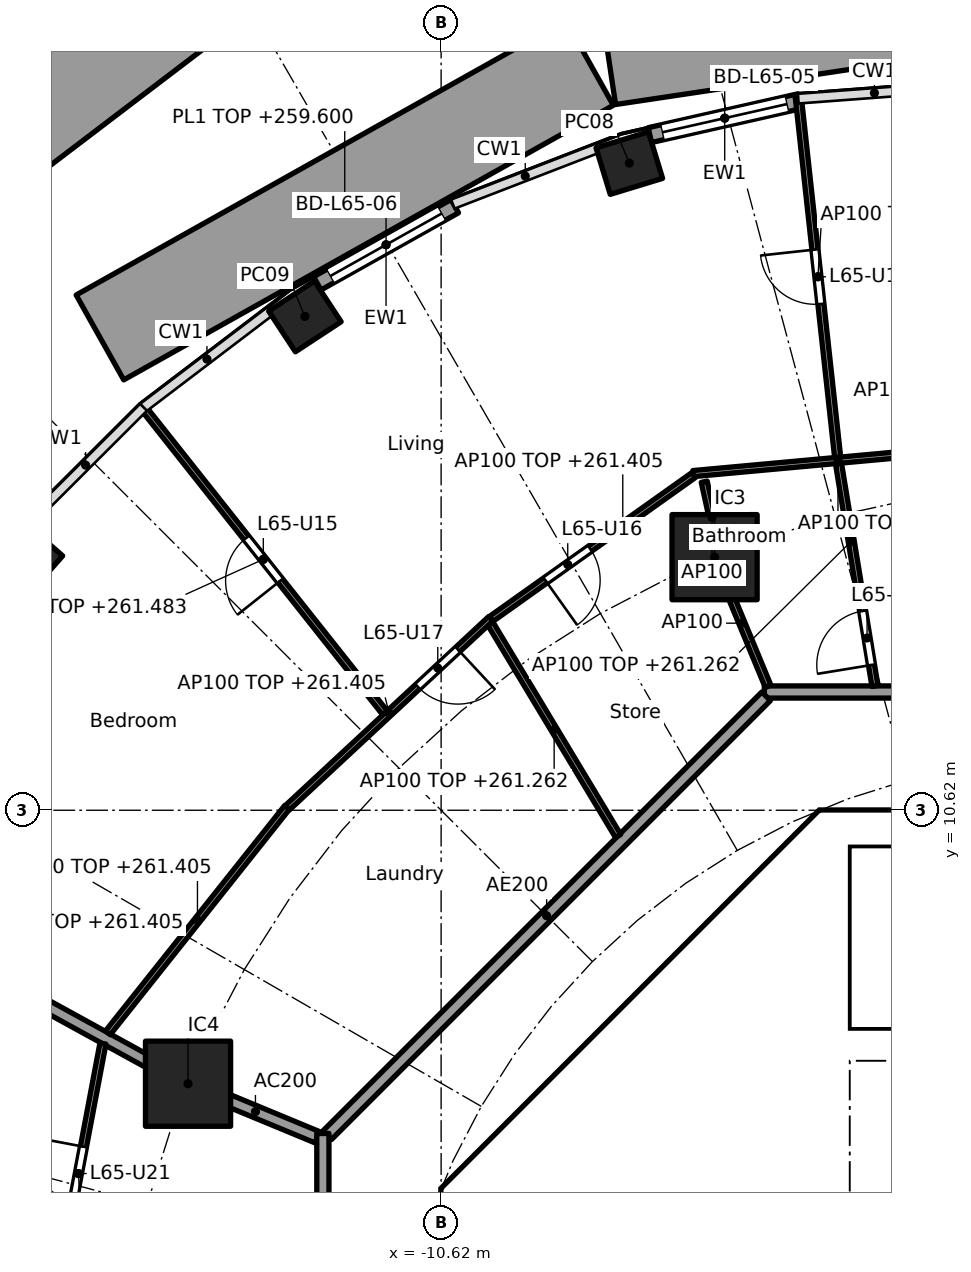
"""IFC4 building model, lengths in metres.
Left out: names, types, materials, properties, quantities, classifications, styles, units other than length and angle.
Written with IfcOpenShell. Run it as: python <this file> out.ifc"""

import sys

from ifc_helpers import new_model, si_unit, direction, frame, frame_2d, origin, origin_2d, place, context, subcontext, project, spatial, polyline, rectangle, hollow_rectangle, outline, extrude, element, fill, save


model = new_model("IFC4")
c1 = context("Model", 3, precision=1e-05, world=origin(), true_north=direction((0.0, 1.0)))
c2 = subcontext(c1, "Body", "Model", "MODEL_VIEW")
j1 = project(units=[si_unit("LENGTHUNIT", "METRE"), si_unit("PLANEANGLEUNIT", "RADIAN")], contexts=[c1])
p1 = place(None, origin())
s1 = spatial("IfcSite", under=j1, at=p1, CompositionType="ELEMENT")
p2 = place(p1, origin())
s2 = spatial("IfcBuilding", under=s1, at=p2, CompositionType="ELEMENT")
p3 = place(p2, frame((0.0, 0.0, 258.5)))
s3 = spatial("IfcBuildingStorey", under=s2, at=p3, CompositionType="ELEMENT", Elevation=258.5)
for number, where, z_axis, x_axis in (
    (1, (-7.525, 21.262, -0.26), (0.0, 0.0, 1.0), (-0.957, -0.292, 0.0)),
    (2, (-12.86, 18.741, -0.26), (0.0, 0.0, 1.0), (-0.836, -0.549, 0.0)),
    (3, (-17.441, 14.73, -0.26), (0.0, 0.0, 1.0), (-0.66, -0.751, 0.0)),
):
    element("IfcColumn", number, at=place(p3, frame(where, z_axis=z_axis, x_axis=x_axis)), inside=s3, PredefinedType="COLUMN", context=c2, shape_type="SweptSolid", body=[
        extrude(hollow_rectangle(XDim=0.9, YDim=0.8, WallThickness=0.028, at=origin_2d()), origin(), (0.0, 0.0, 1.0), 3.96),
    ])
for number, where, z_axis, x_axis in (
    (4, (-6.123, 14.782, 0.0), (0.0, 0.0, 1.0), (1.0, 0.0, 0.0)),
    (5, (-14.782, 6.123, 0.0), (0.0, 0.0, 1.0), (1.0, 0.0, 0.0)),
):
    element("IfcColumn", number, at=place(p3, frame(where, z_axis=z_axis, x_axis=x_axis)), inside=s3, PredefinedType="COLUMN", context=c2, shape_type="SweptSolid", body=[
        extrude(rectangle(XDim=1.4, YDim=1.4, at=origin_2d()), origin(), (0.0, 0.0, 1.0), 3.7),
    ])
p4 = place(p3, frame((-7.188, 21.723, 0.0), z_axis=(0.0, 0.0, 1.0), x_axis=(0.975319584032, 0.220797891756, 0.0)))
e6 = element("IfcWall", 6, at=p4, inside=s3, PredefinedType="SOLIDWALL", context=c2, shape_type="SweptSolid", body=[
    extrude(rectangle(XDim=2.525, YDim=0.25, at=frame_2d((1.263, 0.0))), origin(), (0.0, 0.0, 1.0), 3.44),
])
p5 = place(p4, frame((0.213, 0.0, 0.0)))
e7 = element("IfcOpeningElement", 7, at=p5, cuts=e6, PredefinedType="OPENING", context=c2, shape_type="SweptSolid", body=[
    extrude(rectangle(XDim=2.1, YDim=2.4, at=frame_2d((1.05, 1.2))), frame((0.0, 0.135, 0.0), z_axis=(0.0, -1.0, 0.0), x_axis=(1.0, 0.0, 0.0)), (0.0, 0.0, 1.0), 0.27),
])
p6 = place(p3, frame((-12.656, 19.285, 0.0), z_axis=(0.0, 0.0, 1.0), x_axis=(0.872075426507, 0.489371485154, 0.0)))
e8 = element("IfcWall", 8, at=p6, inside=s3, PredefinedType="SOLIDWALL", context=c2, shape_type="SweptSolid", body=[
    extrude(rectangle(XDim=2.593, YDim=0.25, at=frame_2d((1.297, 0.0))), origin(), (0.0, 0.0, 1.0), 3.44),
])
p7 = place(p6, frame((0.247, 0.0, 0.0)))
e9 = element("IfcOpeningElement", 9, at=p7, cuts=e8, PredefinedType="OPENING", context=c2, shape_type="SweptSolid", body=[
    extrude(rectangle(XDim=2.1, YDim=2.4, at=frame_2d((1.05, 1.2))), frame((0.0, 0.135, 0.0), z_axis=(0.0, -1.0, 0.0), x_axis=(1.0, 0.0, 0.0)), (0.0, 0.0, 1.0), 0.27),
])
p8 = place(p3, frame((-17.7, 21.733, 0.0), z_axis=(0.0, 0.0, 1.0), x_axis=(0.795897017081, 0.605432026078, 0.0)))
e10 = element("IfcWall", 10, at=p8, inside=s3, PredefinedType="SOLIDWALL", context=c2, shape_type="SweptSolid", body=[
    extrude(rectangle(XDim=8.909, YDim=1.6, at=frame_2d((4.454, 0.0))), origin(), (0.0, 0.0, 1.0), 1.1),
])
p9 = place(p3, frame((-8.179, 22.911, 0.0), z_axis=(0.0, 0.0, 1.0), x_axis=(-0.872191481834, -0.489164613413, 0.0)))
e11 = element("IfcWall", 11, at=p9, inside=s3, PredefinedType="SOLIDWALL", context=c2, shape_type="SweptSolid", body=[
    extrude(rectangle(XDim=9.231, YDim=1.6, at=frame_2d((4.615, 0.0))), origin(), (0.0, 0.0, 1.0), 1.1),
])
p10 = place(p3, frame((-1.999, 23.896, 0.0), z_axis=(0.0, 0.0, 1.0), x_axis=(-0.988966799741, -0.148137331587, 0.0)))
e12 = element("IfcWall", 12, at=p10, inside=s3, PredefinedType="SOLIDWALL", context=c2, shape_type="SweptSolid", body=[
    extrude(rectangle(XDim=5.936, YDim=1.6, at=frame_2d((2.968, 0.0))), origin(), (0.0, 0.0, 1.0), 1.1),
])
p11 = place(p3, frame((-4.613, 9.988, 0.0), z_axis=(0.0, 0.0, 1.0), x_axis=(-0.707106781187, -0.707106781187, 0.0)))
e13 = element("IfcWall", 13, at=p11, inside=s3, PredefinedType="SHEAR", context=c2, shape_type="SweptSolid", body=[
    extrude(rectangle(XDim=7.602, YDim=0.6, at=frame_2d((3.801, 0.0))), origin(), (0.0, 0.0, 1.0), 3.44),
])
p12 = place(p11, frame((0.351, 0.0, 0.0)))
e14 = element("IfcOpeningElement", 14, at=p12, cuts=e13, PredefinedType="OPENING", context=c2, shape_type="SweptSolid", body=[
    extrude(rectangle(XDim=1.1, YDim=2.1, at=frame_2d((0.55, 1.05))), frame((0.0, 0.31, 0.0), z_axis=(0.0, -1.0, 0.0), x_axis=(1.0, 0.0, 0.0)), (0.0, 0.0, 1.0), 0.62),
])
p13 = place(p3, frame((-5.8, 4.3, 0.0), z_axis=(0.0, 0.0, 1.0), x_axis=(0.0, 1.0, 0.0)))
e15 = element("IfcWall", 15, at=p13, inside=s3, PredefinedType="PARTITIONING", context=c2, shape_type="SweptSolid", body=[
    extrude(rectangle(XDim=3.927, YDim=0.15, at=frame_2d((1.963, 0.0))), origin(), (0.0, 0.0, 1.0), 3.44),
])
p14 = place(p13, frame((1.551, 0.0, 0.0)))
e16 = element("IfcOpeningElement", 16, at=p14, cuts=e15, PredefinedType="OPENING", context=c2, shape_type="SweptSolid", body=[
    extrude(rectangle(XDim=0.9, YDim=2.1, at=frame_2d((0.45, 1.05))), frame((0.0, 0.085, 0.0), z_axis=(0.0, -1.0, 0.0), x_axis=(1.0, 0.0, 0.0)), (0.0, 0.0, 1.0), 0.17),
])
p15 = place(p3, frame((-4.0, 4.3, 0.0), z_axis=(0.0, 0.0, 1.0), x_axis=(0.0, 1.0, 0.0)))
e17 = element("IfcWall", 17, at=p15, inside=s3, PredefinedType="SOLIDWALL", context=c2, shape_type="SweptSolid", body=[
    extrude(rectangle(XDim=2.2, YDim=0.2, at=frame_2d((1.1, 0.0))), origin(), (0.0, 0.0, 1.0), 3.44),
])
p16 = place(p15, frame((0.55, 0.0, 0.0)))
e18 = element("IfcOpeningElement", 18, at=p16, cuts=e17, PredefinedType="OPENING", context=c2, shape_type="SweptSolid", body=[
    extrude(rectangle(XDim=1.1, YDim=2.1, at=frame_2d((0.55, 1.05))), frame((0.0, 0.11, 0.0), z_axis=(0.0, -1.0, 0.0), x_axis=(1.0, 0.0, 0.0)), (0.0, 0.0, 1.0), 0.22),
])
p17 = place(p3, origin())
e19 = element("IfcWall", 19, at=p17, inside=s3, PredefinedType="SHEAR", context=c2, shape_type="SweptSolid", body=[
    extrude(outline(polyline([(-10.2, 4.825), (-9.776, 4.401), (-10.025, 4.152), (-10.025, 3.801), (-10.625, 3.801), (-10.625, 4.401), (-10.2, 4.825)])), origin(), (0.0, 0.0, 1.0), 3.44),
])
p18 = place(p3, origin())
e20 = element("IfcWall", 20, at=p18, inside=s3, PredefinedType="SHEAR", context=c2, shape_type="SweptSolid", body=[
    extrude(outline(polyline([(-4.152, 10.025), (-4.401, 9.776), (-4.825, 10.2), (-4.401, 10.625), (4.401, 10.625), (4.825, 10.2), (4.401, 9.776), (4.152, 10.025), (-4.152, 10.025)])), origin(), (0.0, 0.0, 1.0), 3.44),
])
p19 = place(p3, origin())
e21 = element("IfcWall", 21, at=p19, inside=s3, PredefinedType="SOLIDWALL", context=c2, shape_type="SweptSolid", body=[
    extrude(outline(polyline([(-3.9, 7.025), (-4.1, 7.025), (-4.1, 10.025), (-3.9, 10.025), (-3.9, 7.025)])), origin(), (0.0, 0.0, 1.0), 3.44),
])
p20 = place(p3, origin())
e22 = element("IfcWall", 22, at=p20, inside=s3, PredefinedType="SOLIDWALL", context=c2, shape_type="SweptSolid", body=[
    extrude(outline(polyline([(4.1, 6.5), (-4.1, 6.5), (-4.1, 7.025), (4.1, 7.025), (4.1, 6.5)])), origin(), (0.0, 0.0, 1.0), 3.44),
])
p21 = place(p3, frame((-12.657, 5.243, 0.0), z_axis=(0.0, 0.0, 1.0), x_axis=(-0.923869415315, 0.382707856524, 0.0)))
e23 = element("IfcWall", 23, at=p21, inside=s3, PredefinedType="PARTITIONING", context=c2, shape_type="SweptSolid", body=[
    extrude(rectangle(XDim=2.2, YDim=0.2, at=frame_2d((1.1, 0.0))), origin(), (0.0, 0.0, 1.0), 3.44),
])
p22 = place(p3, frame((-14.826, 6.147, 0.0), z_axis=(0.0, 0.0, 1.0), x_axis=(-0.876484755865, 0.481429613481, 0.0)))
e24 = element("IfcWall", 24, at=p22, inside=s3, PredefinedType="PARTITIONING", context=c2, shape_type="SweptSolid", body=[
    extrude(rectangle(XDim=6.439, YDim=0.2, at=frame_2d((3.219, 0.0))), origin(), (0.0, 0.0, 1.0), 2.905),
])
p23 = place(p3, frame((5.104, 12.565, 0.0), z_axis=(0.0, 0.0, 1.0), x_axis=(-1.0, 0.0, 0.0)))
e25 = element("IfcWall", 25, at=p23, inside=s3, PredefinedType="PARTITIONING", context=c2, shape_type="SweptSolid", body=[
    extrude(rectangle(XDim=10.409, YDim=0.2, at=frame_2d((5.205, 0.0))), origin(), (0.0, 0.0, 1.0), 3.44),
])
p24 = place(p23, frame((6.339, 0.0, 0.0)))
e26 = element("IfcOpeningElement", 26, at=p24, cuts=e25, PredefinedType="OPENING", context=c2, shape_type="SweptSolid", body=[
    extrude(rectangle(XDim=1.0, YDim=2.1, at=frame_2d((0.5, 1.05))), frame((0.0, 0.11, 0.0), z_axis=(0.0, -1.0, 0.0), x_axis=(1.0, 0.0, 0.0)), (0.0, 0.0, 1.0), 0.22),
])
p25 = place(p3, frame((-5.275, 12.494, 0.0), z_axis=(0.0, 0.0, 1.0), x_axis=(-0.707106781187, -0.707106781187, 0.0)))
e27 = element("IfcWall", 27, at=p25, inside=s3, PredefinedType="PARTITIONING", context=c2, shape_type="SweptSolid", body=[
    extrude(rectangle(XDim=10.209, YDim=0.2, at=frame_2d((5.104, 0.0))), origin(), (0.0, 0.0, 1.0), 3.44),
])
p26 = place(p3, frame((-12.565, 5.304, 0.0), z_axis=(0.0, 0.0, 1.0), x_axis=(0.0, -1.0, 0.0)))
e28 = element("IfcWall", 28, at=p26, inside=s3, PredefinedType="PARTITIONING", context=c2, shape_type="SweptSolid", body=[
    extrude(rectangle(XDim=10.409, YDim=0.2, at=frame_2d((5.205, 0.0))), origin(), (0.0, 0.0, 1.0), 3.44),
])
p27 = place(p26, frame((6.539, 0.0, 0.0)))
e29 = element("IfcOpeningElement", 29, at=p27, cuts=e28, PredefinedType="OPENING", context=c2, shape_type="SweptSolid", body=[
    extrude(rectangle(XDim=1.0, YDim=2.1, at=frame_2d((0.5, 1.05))), frame((0.0, 0.11, 0.0), z_axis=(0.0, -1.0, 0.0), x_axis=(1.0, 0.0, 0.0)), (0.0, 0.0, 1.0), 0.22),
])
p28 = place(p3, frame((-1.711, 16.592, 0.0), z_axis=(0.0, 0.0, 1.0), x_axis=(-0.995843707015, -0.091078599017, 0.0)))
e30 = element("IfcWall", 30, at=p28, inside=s3, PredefinedType="PARTITIONING", context=c2, shape_type="SweptSolid", body=[
    extrude(rectangle(XDim=4.785, YDim=0.1, at=frame_2d((2.392, 0.0))), origin(), (0.0, 0.0, 1.0), 2.905),
])
p29 = place(p3, frame((-3.486, 12.663, 0.0), z_axis=(0.0, 0.0, 1.0), x_axis=(-0.161602751674, 0.986855891532, 0.0)))
e31 = element("IfcWall", 31, at=p29, inside=s3, PredefinedType="PARTITIONING", context=c2, shape_type="SweptSolid", body=[
    extrude(rectangle(XDim=3.71, YDim=0.1, at=frame_2d((1.855, 0.0))), origin(), (0.0, 0.0, 1.0), 2.762),
])
p30 = place(p29, frame((0.35, 0.0, 0.0)))
e32 = element("IfcOpeningElement", 32, at=p30, cuts=e31, PredefinedType="OPENING", context=c2, shape_type="SweptSolid", body=[
    extrude(rectangle(XDim=0.9, YDim=2.1, at=frame_2d((0.45, 1.05))), frame((0.0, 0.06, 0.0), z_axis=(0.0, -1.0, 0.0), x_axis=(1.0, 0.0, 0.0)), (0.0, 0.0, 1.0), 0.12),
])
p31 = place(p3, frame((-4.099, 16.424, 0.0), z_axis=(0.0, 0.0, 1.0), x_axis=(-0.10867295252, 0.99407755703, 0.0)))
e33 = element("IfcWall", 33, at=p31, inside=s3, PredefinedType="PARTITIONING", context=c2, shape_type="SweptSolid", body=[
    extrude(rectangle(XDim=5.974, YDim=0.1, at=frame_2d((2.987, 0.0))), origin(), (0.0, 0.0, 1.0), 2.983),
])
p32 = place(p31, frame((2.537, 0.0, 0.0)))
e34 = element("IfcOpeningElement", 34, at=p32, cuts=e33, PredefinedType="OPENING", context=c2, shape_type="SweptSolid", body=[
    extrude(rectangle(XDim=0.9, YDim=2.1, at=frame_2d((0.45, 1.05))), frame((0.0, 0.06, 0.0), z_axis=(0.0, -1.0, 0.0), x_axis=(1.0, 0.0, 0.0)), (0.0, 0.0, 1.0), 0.12),
])
p33 = place(p3, frame((-5.243, 12.657, 0.0), z_axis=(0.0, 0.0, 1.0), x_axis=(-0.382719158442, 0.923864733477, 0.0)))
e35 = element("IfcWall", 35, at=p33, inside=s3, PredefinedType="PARTITIONING", context=c2, shape_type="SweptSolid", body=[
    extrude(rectangle(XDim=2.25, YDim=0.1, at=frame_2d((1.125, 0.0))), origin(), (0.0, 0.0, 1.0), 3.44),
])
p34 = place(p3, frame((-6.467, 16.132, 0.0), z_axis=(0.0, 0.0, 1.0), x_axis=(-0.815192286069, -0.579190414919, 0.0)))
e36 = element("IfcWall", 36, at=p34, inside=s3, PredefinedType="PARTITIONING", context=c2, shape_type="SweptSolid", body=[
    extrude(rectangle(XDim=4.086, YDim=0.1, at=frame_2d((2.043, 0.0))), origin(), (0.0, 0.0, 1.0), 2.905),
])
p35 = place(p34, frame((2.09, 0.0, 0.0)))
e37 = element("IfcOpeningElement", 37, at=p35, cuts=e36, PredefinedType="OPENING", context=c2, shape_type="SweptSolid", body=[
    extrude(rectangle(XDim=0.9, YDim=2.1, at=frame_2d((0.45, 1.05))), frame((0.0, 0.06, 0.0), z_axis=(0.0, -1.0, 0.0), x_axis=(1.0, 0.0, 0.0)), (0.0, 0.0, 1.0), 0.12),
])
p36 = place(p3, frame((-7.709, 10.197, 0.0), z_axis=(0.0, 0.0, 1.0), x_axis=(-0.515524871668, 0.856874615502, 0.0)))
e38 = element("IfcWall", 38, at=p36, inside=s3, PredefinedType="PARTITIONING", context=c2, shape_type="SweptSolid", body=[
    extrude(rectangle(XDim=4.08, YDim=0.1, at=frame_2d((2.04, 0.0))), origin(), (0.0, 0.0, 1.0), 2.762),
])
p37 = place(p3, frame((-9.802, 13.77, 0.0), z_axis=(0.0, 0.0, 1.0), x_axis=(-0.732662099478, -0.680592571212, 0.0)))
e39 = element("IfcWall", 39, at=p37, inside=s3, PredefinedType="PARTITIONING", context=c2, shape_type="SweptSolid", body=[
    extrude(rectangle(XDim=4.567, YDim=0.1, at=frame_2d((2.283, 0.0))), origin(), (0.0, 0.0, 1.0), 2.905),
])
p38 = place(p37, frame((0.742, 0.0, 0.0)))
e40 = element("IfcOpeningElement", 40, at=p38, cuts=e39, PredefinedType="OPENING", context=c2, shape_type="SweptSolid", body=[
    extrude(rectangle(XDim=0.9, YDim=2.1, at=frame_2d((0.45, 1.05))), frame((0.0, 0.06, 0.0), z_axis=(0.0, -1.0, 0.0), x_axis=(1.0, 0.0, 0.0)), (0.0, 0.0, 1.0), 0.12),
])
p39 = place(p3, frame((-11.543, 12.221, 0.0), z_axis=(0.0, 0.0, 1.0), x_axis=(-0.621117202271, 0.783717692185, 0.0)))
e41 = element("IfcWall", 41, at=p39, inside=s3, PredefinedType="PARTITIONING", context=c2, shape_type="SweptSolid", body=[
    extrude(rectangle(XDim=6.444, YDim=0.1, at=frame_2d((3.222, 0.0))), origin(), (0.0, 0.0, 1.0), 2.983),
])
p40 = place(p39, frame((2.772, 0.0, 0.0)))
e42 = element("IfcOpeningElement", 42, at=p40, cuts=e41, PredefinedType="OPENING", context=c2, shape_type="SweptSolid", body=[
    extrude(rectangle(XDim=0.9, YDim=2.1, at=frame_2d((0.45, 1.05))), frame((0.0, 0.06, 0.0), z_axis=(0.0, -1.0, 0.0), x_axis=(1.0, 0.0, 0.0)), (0.0, 0.0, 1.0), 0.12),
])
p41 = place(p3, frame((-13.154, 10.667, 0.0), z_axis=(0.0, 0.0, 1.0), x_axis=(-0.622246555556, -0.782821323227, 0.0)))
e43 = element("IfcWall", 43, at=p41, inside=s3, PredefinedType="PARTITIONING", context=c2, shape_type="SweptSolid", body=[
    extrude(rectangle(XDim=4.736, YDim=0.1, at=frame_2d((2.368, 0.0))), origin(), (0.0, 0.0, 1.0), 2.905),
])
p42 = place(p3, frame((-16.181, 6.783, 0.0), z_axis=(0.0, 0.0, 1.0), x_axis=(-0.185670583745, -0.982612046706, 0.0)))
e44 = element("IfcWall", 44, at=p42, inside=s3, PredefinedType="PARTITIONING", context=c2, shape_type="SweptSolid", body=[
    extrude(rectangle(XDim=4.351, YDim=0.1, at=frame_2d((2.176, 0.0))), origin(), (0.0, 0.0, 1.0), 2.905),
])
p43 = place(p42, frame((1.726, 0.0, 0.0)))
e45 = element("IfcOpeningElement", 45, at=p43, cuts=e44, PredefinedType="OPENING", context=c2, shape_type="SweptSolid", body=[
    extrude(rectangle(XDim=0.9, YDim=2.1, at=frame_2d((0.45, 1.05))), frame((0.0, 0.06, 0.0), z_axis=(0.0, -1.0, 0.0), x_axis=(1.0, 0.0, 0.0)), (0.0, 0.0, 1.0), 0.12),
])
p44 = place(p3, frame((-6.036, 14.853, 0.0), z_axis=(0.0, 0.0, 1.0), x_axis=(-0.215009518078, 0.976611953202, 0.0)))
e46 = element("IfcWall", 46, at=p44, inside=s3, PredefinedType="PARTITIONING", context=c2, shape_type="SweptSolid", body=[
    extrude(rectangle(XDim=1.198, YDim=0.1, at=frame_2d((0.599, 0.0))), origin(), (0.0, 0.0, 1.0), 3.44),
])
p45 = place(p5, origin())
e47 = element("IfcDoor", 47, at=p45, inside=s3, OperationType="SLIDING_TO_LEFT", PredefinedType="DOOR", context=c2, shape_type="SweptSolid", body=[
    extrude(rectangle(XDim=2.1, YDim=2.4, at=frame_2d((1.05, 1.2))), frame((0.0, 0.025, 0.0), z_axis=(0.0, -1.0, 0.0), x_axis=(1.0, 0.0, 0.0)), (0.0, 0.0, 1.0), 0.05),
])
fill(e7, e47)
p46 = place(p7, origin())
e48 = element("IfcDoor", 48, at=p46, inside=s3, OperationType="SLIDING_TO_LEFT", PredefinedType="DOOR", context=c2, shape_type="SweptSolid", body=[
    extrude(rectangle(XDim=2.1, YDim=2.4, at=frame_2d((1.05, 1.2))), frame((0.0, 0.025, 0.0), z_axis=(0.0, -1.0, 0.0), x_axis=(1.0, 0.0, 0.0)), (0.0, 0.0, 1.0), 0.05),
])
fill(e9, e48)
p47 = place(p16, origin())
e49 = element("IfcDoor", 49, at=p47, inside=s3, OperationType="DOUBLE_DOOR_SLIDING", PredefinedType="DOOR", context=c2, shape_type="SweptSolid", body=[
    extrude(rectangle(XDim=1.1, YDim=2.1, at=frame_2d((0.55, 1.05))), frame((0.0, 0.025, 0.0), z_axis=(0.0, -1.0, 0.0), x_axis=(1.0, 0.0, 0.0)), (0.0, 0.0, 1.0), 0.05),
])
fill(e18, e49)
p48 = place(p14, origin())
e50 = element("IfcDoor", 50, at=p48, inside=s3, OperationType="SINGLE_SWING_LEFT", PredefinedType="DOOR", context=c2, shape_type="SweptSolid", body=[
    extrude(rectangle(XDim=0.9, YDim=2.1, at=frame_2d((0.45, 1.05))), frame((0.0, 0.025, 0.0), z_axis=(0.0, -1.0, 0.0), x_axis=(1.0, 0.0, 0.0)), (0.0, 0.0, 1.0), 0.05),
])
fill(e16, e50)
p49 = place(p12, origin())
e51 = element("IfcDoor", 51, at=p49, inside=s3, OperationType="SINGLE_SWING_LEFT", PredefinedType="DOOR", context=c2, shape_type="SweptSolid", body=[
    extrude(rectangle(XDim=1.1, YDim=2.1, at=frame_2d((0.55, 1.05))), frame((0.0, 0.025, 0.0), z_axis=(0.0, -1.0, 0.0), x_axis=(1.0, 0.0, 0.0)), (0.0, 0.0, 1.0), 0.05),
])
fill(e14, e51)
p50 = place(p30, origin())
e52 = element("IfcDoor", 52, at=p50, inside=s3, OperationType="SINGLE_SWING_LEFT", PredefinedType="DOOR", context=c2, shape_type="SweptSolid", body=[
    extrude(rectangle(XDim=0.9, YDim=2.1, at=frame_2d((0.45, 1.05))), frame((0.0, 0.025, 0.0), z_axis=(0.0, -1.0, 0.0), x_axis=(1.0, 0.0, 0.0)), (0.0, 0.0, 1.0), 0.05),
])
fill(e32, e52)
p51 = place(p32, origin())
e53 = element("IfcDoor", 53, at=p51, inside=s3, OperationType="SINGLE_SWING_RIGHT", PredefinedType="DOOR", context=c2, shape_type="SweptSolid", body=[
    extrude(rectangle(XDim=0.9, YDim=2.1, at=frame_2d((0.45, 1.05))), frame((0.0, 0.025, 0.0), z_axis=(0.0, -1.0, 0.0), x_axis=(1.0, 0.0, 0.0)), (0.0, 0.0, 1.0), 0.05),
])
fill(e34, e53)
p52 = place(p40, origin())
e54 = element("IfcDoor", 54, at=p52, inside=s3, OperationType="SINGLE_SWING_LEFT", PredefinedType="DOOR", context=c2, shape_type="SweptSolid", body=[
    extrude(rectangle(XDim=0.9, YDim=2.1, at=frame_2d((0.45, 1.05))), frame((0.0, 0.025, 0.0), z_axis=(0.0, -1.0, 0.0), x_axis=(1.0, 0.0, 0.0)), (0.0, 0.0, 1.0), 0.05),
])
fill(e42, e54)
p53 = place(p35, origin())
e55 = element("IfcDoor", 55, at=p53, inside=s3, OperationType="SINGLE_SWING_RIGHT", PredefinedType="DOOR", context=c2, shape_type="SweptSolid", body=[
    extrude(rectangle(XDim=0.9, YDim=2.1, at=frame_2d((0.45, 1.05))), frame((0.0, 0.025, 0.0), z_axis=(0.0, -1.0, 0.0), x_axis=(1.0, 0.0, 0.0)), (0.0, 0.0, 1.0), 0.05),
])
fill(e37, e55)
p54 = place(p38, origin())
e56 = element("IfcDoor", 56, at=p54, inside=s3, OperationType="SINGLE_SWING_LEFT", PredefinedType="DOOR", context=c2, shape_type="SweptSolid", body=[
    extrude(rectangle(XDim=0.9, YDim=2.1, at=frame_2d((0.45, 1.05))), frame((0.0, 0.025, 0.0), z_axis=(0.0, -1.0, 0.0), x_axis=(1.0, 0.0, 0.0)), (0.0, 0.0, 1.0), 0.05),
])
fill(e40, e56)
p55 = place(p43, frame((0.9, 0.0, 0.0), x_axis=(-1.0, 0.0, 0.0)))
e57 = element("IfcDoor", 57, at=p55, inside=s3, OperationType="SINGLE_SWING_RIGHT", PredefinedType="DOOR", context=c2, shape_type="SweptSolid", body=[
    extrude(rectangle(XDim=0.9, YDim=2.1, at=frame_2d((0.45, 1.05))), frame((0.0, 0.025, 0.0), z_axis=(0.0, -1.0, 0.0), x_axis=(1.0, 0.0, 0.0)), (0.0, 0.0, 1.0), 0.05),
])
fill(e45, e57)
save(model, sys.argv[1])
